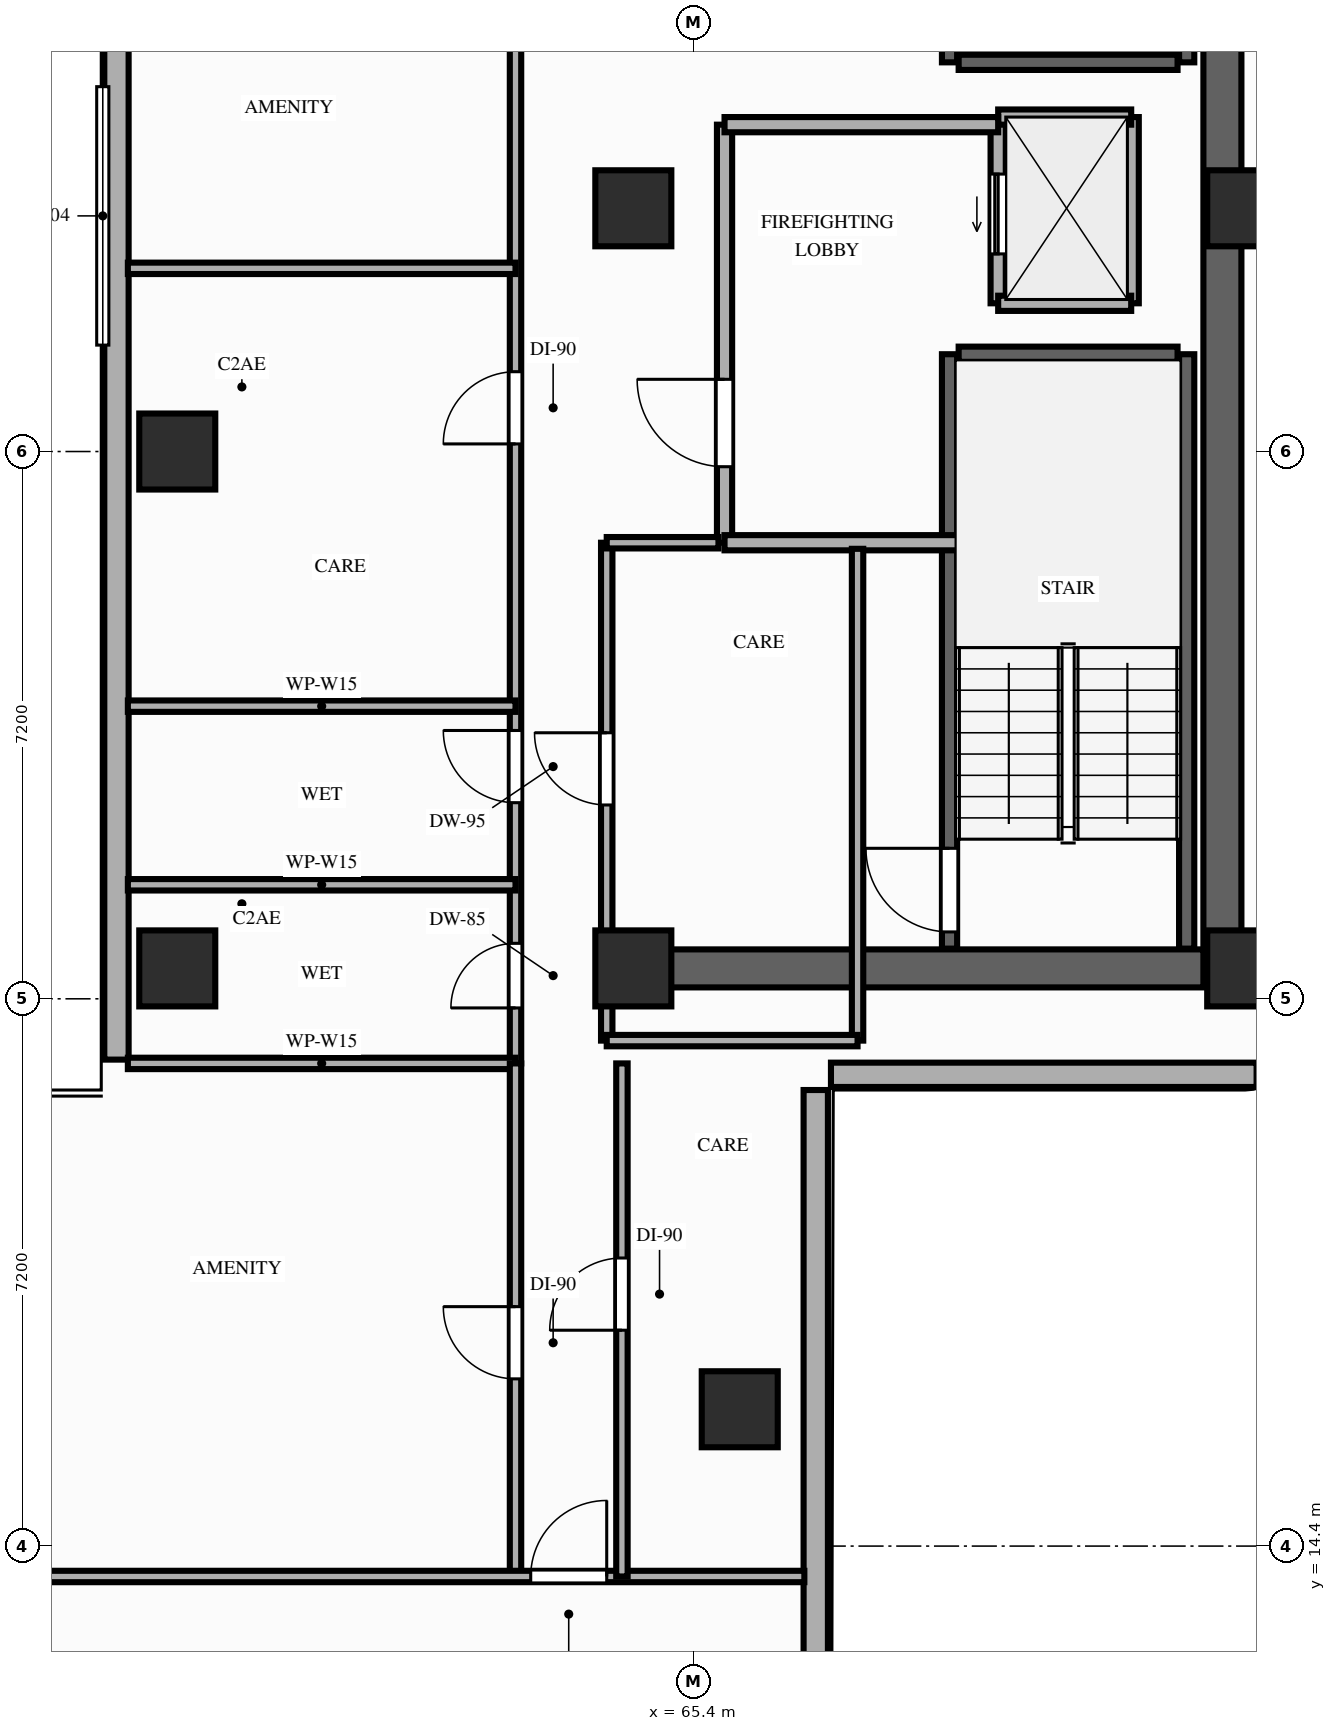
"""IFC4 building model, lengths in metres.
Left out: names, types, materials, properties, quantities, classifications, styles, units other than length and angle.
Written with IfcOpenShell. Run it as: python <this file> out.ifc"""

import sys

from ifc_helpers import new_model, si_unit, direction, frame, frame_2d, origin, origin_2d, place, context, subcontext, project, spatial, rectangle, extrude, element, fill, save


model = new_model("IFC4")
c1 = context("Model", 3, precision=1e-05, world=origin(), true_north=direction((0.0, 1.0)))
c2 = subcontext(c1, "Body", "Model", "MODEL_VIEW")
j1 = project(units=[si_unit("LENGTHUNIT", "METRE"), si_unit("PLANEANGLEUNIT", "RADIAN")], contexts=[c1])
p1 = place(None, origin())
s1 = spatial("IfcSite", under=j1, at=p1, CompositionType="ELEMENT")
p2 = place(p1, origin())
s2 = spatial("IfcBuilding", under=s1, at=p2, CompositionType="ELEMENT")
p3 = place(p2, frame((0.0, 0.0, 53.2)))
s3 = spatial("IfcBuildingStorey", under=s2, at=p3, CompositionType="ELEMENT", Elevation=53.2)
for number, where, z_axis, x_axis in (
    (1, (64.6, 22.0, 0.0), (0.0, 0.0, 1.0), (1.0, 0.0, 0.0)),
    (2, (72.65, 22.0, 0.0), (0.0, 0.0, 1.0), (1.0, 0.0, 0.0)),
    (3, (64.6, 32.0, 0.0), (0.0, 0.0, 1.0), (1.0, 0.0, 0.0)),
    (4, (72.65, 32.0, 0.0), (0.0, 0.0, 1.0), (1.0, 0.0, 0.0)),
    (5, (58.6, 22.0, 0.0), (0.0, 0.0, 1.0), (1.0, 0.0, 0.0)),
    (6, (58.6, 28.8, 0.0), (0.0, 0.0, 1.0), (1.0, 0.0, 0.0)),
    (7, (66.0, 16.2, 0.0), (0.0, 0.0, 1.0), (1.0, 0.0, 0.0)),
):
    element("IfcColumn", number, at=place(p3, frame(where, z_axis=z_axis, x_axis=x_axis)), inside=s3, PredefinedType="COLUMN", context=c2, shape_type="SweptSolid", body=[
        extrude(rectangle(XDim=1.0, YDim=1.0, at=origin_2d()), origin(), (0.0, 0.0, 1.0), 3.2),
    ])
p4 = place(p3, frame((57.8, 43.4, 0.0), z_axis=(0.0, 0.0, 1.0), x_axis=(0.0, -1.0, 0.0)))
e8 = element("IfcWall", 8, at=p4, inside=s3, PredefinedType="STANDARD", context=c2, shape_type="SweptSolid", body=[
    extrude(rectangle(XDim=22.6, YDim=0.32, at=frame_2d((11.3, 0.0))), origin(), (0.0, 0.0, 1.0), 2.5),
])
p5 = place(p3, frame((67.0, 7.6, 0.0), z_axis=(0.0, 0.0, 1.0), x_axis=(0.0, 1.0, 0.0)))
e9 = element("IfcWall", 9, at=p5, inside=s3, PredefinedType="STANDARD", context=c2, shape_type="SweptSolid", body=[
    extrude(rectangle(XDim=12.8, YDim=0.32, at=frame_2d((6.4, 0.0))), origin(), (0.0, 0.0, 1.0), 3.02),
])
p6 = place(p3, frame((67.2, 20.6, 0.0), z_axis=(0.0, 0.0, 1.0), x_axis=(1.0, 0.0, 0.0)))
e10 = element("IfcWall", 10, at=p6, inside=s3, PredefinedType="STANDARD", context=c2, shape_type="SweptSolid", body=[
    extrude(rectangle(XDim=5.6, YDim=0.32, at=frame_2d((2.8, 0.0))), origin(), (0.0, 0.0, 1.0), 3.02),
])
p7 = place(p3, frame((72.35, 22.0, 0.0), z_axis=(0.0, 0.0, 1.0), x_axis=(0.0, 1.0, 0.0)))
e11 = element("IfcWall", 11, at=p7, inside=s3, PredefinedType="SHEAR", context=c2, shape_type="SweptSolid", body=[
    extrude(rectangle(XDim=20.25, YDim=0.5, at=frame_2d((10.125, 0.0))), origin(), (0.0, 0.0, 1.0), 3.02),
])
p8 = place(p3, frame((64.6, 22.0, 0.0), z_axis=(0.0, 0.0, 1.0), x_axis=(1.0, 0.0, 0.0)))
e12 = element("IfcWall", 12, at=p8, inside=s3, PredefinedType="SHEAR", context=c2, shape_type="SweptSolid", body=[
    extrude(rectangle(XDim=7.5, YDim=0.5, at=frame_2d((3.75, 0.0))), origin(), (0.0, 0.0, 1.0), 3.02),
])
p9 = place(p3, frame((68.76, 22.26, 0.0), z_axis=(0.0, 0.0, 1.0), x_axis=(0.0, 1.0, 0.0)))
e13 = element("IfcWall", 13, at=p9, inside=s3, PredefinedType="SHEAR", context=c2, shape_type="SweptSolid", body=[
    extrude(rectangle(XDim=7.82, YDim=0.2, at=frame_2d((3.91, 0.0))), origin(), (0.0, 0.0, 1.0), 3.02),
])
p10 = place(p9, frame((0.22, 0.0, 0.0)))
e14 = element("IfcOpeningElement", 14, at=p10, cuts=e13, PredefinedType="OPENING", context=c2, shape_type="SweptSolid", body=[
    extrude(rectangle(XDim=1.1, YDim=2.15, at=frame_2d((0.55, 1.075))), frame((0.0, 0.11, 0.0), z_axis=(0.0, -1.0, 0.0), x_axis=(1.0, 0.0, 0.0)), (0.0, 0.0, 1.0), 0.22),
])
p11 = place(p3, frame((71.88, 22.26, 0.0), z_axis=(0.0, 0.0, 1.0), x_axis=(0.0, 1.0, 0.0)))
e15 = element("IfcWall", 15, at=p11, inside=s3, PredefinedType="SHEAR", context=c2, shape_type="SweptSolid", body=[
    extrude(rectangle(XDim=7.82, YDim=0.2, at=frame_2d((3.91, 0.0))), origin(), (0.0, 0.0, 1.0), 3.02),
])
p12 = place(p3, frame((68.88, 30.08, 0.0), z_axis=(0.0, 0.0, 1.0), x_axis=(1.0, 0.0, 0.0)))
e16 = element("IfcWall", 16, at=p12, inside=s3, PredefinedType="SHEAR", context=c2, shape_type="SweptSolid", body=[
    extrude(rectangle(XDim=2.88, YDim=0.2, at=frame_2d((1.44, 0.0))), origin(), (0.0, 0.0, 1.0), 3.02),
])
p13 = place(p3, frame((68.76, 33.92, 0.0), z_axis=(0.0, 0.0, 1.0), x_axis=(0.0, 1.0, 0.0)))
e17 = element("IfcWall", 17, at=p13, inside=s3, PredefinedType="SHEAR", context=c2, shape_type="SweptSolid", body=[
    extrude(rectangle(XDim=7.96, YDim=0.2, at=frame_2d((3.98, 0.0))), origin(), (0.0, 0.0, 1.0), 3.02),
])
p14 = place(p13, frame((0.22, 0.0, 0.0)))
e18 = element("IfcOpeningElement", 18, at=p14, cuts=e17, PredefinedType="OPENING", context=c2, shape_type="SweptSolid", body=[
    extrude(rectangle(XDim=1.1, YDim=2.15, at=frame_2d((0.55, 1.075))), frame((0.0, 0.11, 0.0), z_axis=(0.0, -1.0, 0.0), x_axis=(1.0, 0.0, 0.0)), (0.0, 0.0, 1.0), 0.22),
])
p15 = place(p3, frame((71.88, 33.92, 0.0), z_axis=(0.0, 0.0, 1.0), x_axis=(0.0, 1.0, 0.0)))
e19 = element("IfcWall", 19, at=p15, inside=s3, PredefinedType="SHEAR", context=c2, shape_type="SweptSolid", body=[
    extrude(rectangle(XDim=7.96, YDim=0.2, at=frame_2d((3.98, 0.0))), origin(), (0.0, 0.0, 1.0), 3.02),
])
p16 = place(p3, frame((68.88, 33.92, 0.0), z_axis=(0.0, 0.0, 1.0), x_axis=(1.0, 0.0, 0.0)))
e20 = element("IfcWall", 20, at=p16, inside=s3, PredefinedType="SHEAR", context=c2, shape_type="SweptSolid", body=[
    extrude(rectangle(XDim=2.88, YDim=0.2, at=frame_2d((1.44, 0.0))), origin(), (0.0, 0.0, 1.0), 3.02),
])
p17 = place(p3, frame((69.4, 30.75, 0.0), z_axis=(0.0, 0.0, 1.0), x_axis=(0.0, 1.0, 0.0)))
e21 = element("IfcWall", 21, at=p17, inside=s3, PredefinedType="MOVABLE", context=c2, shape_type="SweptSolid", body=[
    extrude(rectangle(XDim=2.45, YDim=0.2, at=frame_2d((1.225, 0.0))), origin(), (0.0, 0.0, 1.0), 3.02),
])
p18 = place(p17, frame((0.65, 0.0, 0.0)))
e22 = element("IfcOpeningElement", 22, at=p18, cuts=e21, PredefinedType="OPENING", context=c2, shape_type="SweptSolid", body=[
    extrude(rectangle(XDim=1.05, YDim=2.15, at=frame_2d((0.525, 1.075))), frame((0.0, 0.11, 0.0), z_axis=(0.0, -1.0, 0.0), x_axis=(1.0, 0.0, 0.0)), (0.0, 0.0, 1.0), 0.22),
])
p19 = place(p3, frame((71.15, 30.75, 0.0), z_axis=(0.0, 0.0, 1.0), x_axis=(0.0, 1.0, 0.0)))
e23 = element("IfcWall", 23, at=p19, inside=s3, PredefinedType="MOVABLE", context=c2, shape_type="SweptSolid", body=[
    extrude(rectangle(XDim=2.45, YDim=0.2, at=frame_2d((1.225, 0.0))), origin(), (0.0, 0.0, 1.0), 3.02),
])
for number, where, z_axis, x_axis in (
    (24, (69.4, 33.2, 0.0), (0.0, 0.0, 1.0), (1.0, 0.0, 0.0)),
    (25, (69.4, 30.75, 0.0), (0.0, 0.0, 1.0), (1.0, 0.0, 0.0)),
):
    element("IfcWall", number, at=place(p3, frame(where, z_axis=z_axis, x_axis=x_axis)), inside=s3, PredefinedType="MOVABLE", context=c2, shape_type="SweptSolid", body=[
        extrude(rectangle(XDim=1.75, YDim=0.2, at=frame_2d((0.875, 0.0))), origin(), (0.0, 0.0, 1.0), 3.02),
    ])
p20 = place(p3, frame((65.8, 27.6, 0.0), z_axis=(0.0, 0.0, 1.0), x_axis=(0.0, 1.0, 0.0)))
e26 = element("IfcWall", 26, at=p20, inside=s3, PredefinedType="PARTITIONING", context=c2, shape_type="SweptSolid", body=[
    extrude(rectangle(XDim=5.5, YDim=0.2, at=frame_2d((2.75, 0.0))), origin(), (0.0, 0.0, 1.0), 3.02),
])
p21 = place(p20, frame((1.0, 0.0, 0.0)))
e27 = element("IfcOpeningElement", 27, at=p21, cuts=e26, PredefinedType="OPENING", context=c2, shape_type="SweptSolid", body=[
    extrude(rectangle(XDim=1.15, YDim=2.15, at=frame_2d((0.575, 1.075))), frame((0.0, 0.11, 0.0), z_axis=(0.0, -1.0, 0.0), x_axis=(1.0, 0.0, 0.0)), (0.0, 0.0, 1.0), 0.22),
])
p22 = place(p3, frame((65.8, 33.1, 0.0), z_axis=(0.0, 0.0, 1.0), x_axis=(1.0, 0.0, 0.0)))
e28 = element("IfcWall", 28, at=p22, inside=s3, PredefinedType="PARTITIONING", context=c2, shape_type="SweptSolid", body=[
    extrude(rectangle(XDim=3.6, YDim=0.2, at=frame_2d((1.8, 0.0))), origin(), (0.0, 0.0, 1.0), 3.02),
])
p23 = place(p3, frame((65.8, 27.6, 0.0), z_axis=(0.0, 0.0, 1.0), x_axis=(1.0, 0.0, 0.0)))
e29 = element("IfcWall", 29, at=p23, inside=s3, PredefinedType="PARTITIONING", context=c2, shape_type="SweptSolid", body=[
    extrude(rectangle(XDim=3.4, YDim=0.2, at=frame_2d((1.7, 0.0))), origin(), (0.0, 0.0, 1.0), 3.02),
])
p24 = place(p3, frame((64.25, 21.05, 0.0), z_axis=(0.0, 0.0, 1.0), x_axis=(0.0, 1.0, 0.0)))
e30 = element("IfcWall", 30, at=p24, inside=s3, PredefinedType="PARTITIONING", context=c2, shape_type="SweptSolid", body=[
    extrude(rectangle(XDim=6.55, YDim=0.15, at=frame_2d((3.275, 0.0))), origin(), (0.0, 0.0, 1.0), 2.5),
])
p25 = place(p24, frame((3.1, 0.0, 0.0)))
e31 = element("IfcOpeningElement", 31, at=p25, cuts=e30, PredefinedType="OPENING", context=c2, shape_type="SweptSolid", body=[
    extrude(rectangle(XDim=0.95, YDim=2.15, at=frame_2d((0.475, 1.075))), frame((0.0, 0.085, 0.0), z_axis=(0.0, -1.0, 0.0), x_axis=(1.0, 0.0, 0.0)), (0.0, 0.0, 1.0), 0.17),
])
p26 = place(p3, frame((67.55, 21.05, 0.0), z_axis=(0.0, 0.0, 1.0), x_axis=(0.0, 1.0, 0.0)))
e32 = element("IfcWall", 32, at=p26, inside=s3, PredefinedType="PARTITIONING", context=c2, shape_type="SweptSolid", body=[
    extrude(rectangle(XDim=6.47, YDim=0.15, at=frame_2d((3.235, 0.0))), origin(), (0.0, 0.0, 1.0), 2.5),
])
p27 = place(p3, frame((64.25, 21.05, 0.0), z_axis=(0.0, 0.0, 1.0), x_axis=(1.0, 0.0, 0.0)))
e33 = element("IfcWall", 33, at=p27, inside=s3, PredefinedType="PARTITIONING", context=c2, shape_type="SweptSolid", body=[
    extrude(rectangle(XDim=3.3, YDim=0.15, at=frame_2d((1.65, 0.0))), origin(), (0.0, 0.0, 1.0), 2.5),
])
p28 = place(p3, frame((64.25, 27.6, 0.0), z_axis=(0.0, 0.0, 1.0), x_axis=(1.0, 0.0, 0.0)))
e34 = element("IfcWall", 34, at=p28, inside=s3, PredefinedType="PARTITIONING", context=c2, shape_type="SweptSolid", body=[
    extrude(rectangle(XDim=1.47, YDim=0.15, at=frame_2d((0.735, 0.0))), origin(), (0.0, 0.0, 1.0), 2.5),
])
p29 = place(p3, frame((63.05, 20.75, 0.0), z_axis=(0.0, 0.0, 1.0), x_axis=(0.0, 1.0, 0.0)))
e35 = element("IfcWall", 35, at=p29, inside=s3, PredefinedType="PARTITIONING", context=c2, shape_type="SweptSolid", body=[
    extrude(rectangle(XDim=22.7, YDim=0.15, at=frame_2d((11.35, 0.0))), origin(), (0.0, 0.0, 1.0), 2.5),
])
p30 = place(p29, frame((0.73, 0.0, 0.0)))
e36 = element("IfcOpeningElement", 36, at=p30, cuts=e35, PredefinedType="OPENING", context=c2, shape_type="SweptSolid", body=[
    extrude(rectangle(XDim=0.85, YDim=2.1, at=frame_2d((0.425, 1.05))), frame((0.0, 0.085, 0.0), z_axis=(0.0, -1.0, 0.0), x_axis=(1.0, 0.0, 0.0)), (0.0, 0.0, 1.0), 0.17),
])
p31 = place(p29, frame((3.43, 0.0, 0.0)))
e37 = element("IfcOpeningElement", 37, at=p31, cuts=e35, PredefinedType="OPENING", context=c2, shape_type="SweptSolid", body=[
    extrude(rectangle(XDim=0.95, YDim=2.1, at=frame_2d((0.475, 1.05))), frame((0.0, 0.085, 0.0), z_axis=(0.0, -1.0, 0.0), x_axis=(1.0, 0.0, 0.0)), (0.0, 0.0, 1.0), 0.17),
])
p32 = place(p29, frame((8.15, 0.0, 0.0)))
e38 = element("IfcOpeningElement", 38, at=p32, cuts=e35, PredefinedType="OPENING", context=c2, shape_type="SweptSolid", body=[
    extrude(rectangle(XDim=0.95, YDim=2.15, at=frame_2d((0.475, 1.075))), frame((0.0, 0.085, 0.0), z_axis=(0.0, -1.0, 0.0), x_axis=(1.0, 0.0, 0.0)), (0.0, 0.0, 1.0), 0.17),
])
p33 = place(p29, frame((13.67, 0.0, 0.0)))
e39 = element("IfcOpeningElement", 39, at=p33, cuts=e35, PredefinedType="OPENING", context=c2, shape_type="SweptSolid", body=[
    extrude(rectangle(XDim=0.95, YDim=2.15, at=frame_2d((0.475, 1.075))), frame((0.0, 0.085, 0.0), z_axis=(0.0, -1.0, 0.0), x_axis=(1.0, 0.0, 0.0)), (0.0, 0.0, 1.0), 0.17),
])
p34 = place(p29, frame((19.47, 0.0, 0.0)))
e40 = element("IfcOpeningElement", 40, at=p34, cuts=e35, PredefinedType="OPENING", context=c2, shape_type="SweptSolid", body=[
    extrude(rectangle(XDim=0.95, YDim=2.15, at=frame_2d((0.475, 1.075))), frame((0.0, 0.085, 0.0), z_axis=(0.0, -1.0, 0.0), x_axis=(1.0, 0.0, 0.0)), (0.0, 0.0, 1.0), 0.17),
])
for number, where, z_axis, x_axis in (
    (41, (57.95, 20.75, 0.0), (0.0, 0.0, 1.0), (1.0, 0.0, 0.0)),
    (42, (57.95, 23.1, 0.0), (0.0, 0.0, 1.0), (1.0, 0.0, 0.0)),
    (43, (57.95, 25.45, 0.0), (0.0, 0.0, 1.0), (1.0, 0.0, 0.0)),
    (44, (57.95, 31.21, 0.0), (0.0, 0.0, 1.0), (1.0, 0.0, 0.0)),
):
    element("IfcWall", number, at=place(p3, frame(where, z_axis=z_axis, x_axis=x_axis)), inside=s3, PredefinedType="PARTITIONING", context=c2, shape_type="SweptSolid", body=[
        extrude(rectangle(XDim=5.1, YDim=0.15, at=frame_2d((2.55, 0.0))), origin(), (0.0, 0.0, 1.0), 2.5),
    ])
p35 = place(p3, frame((63.05, 14.0, 0.0), z_axis=(0.0, 0.0, 1.0), x_axis=(0.0, 1.0, 0.0)))
e45 = element("IfcWall", 45, at=p35, inside=s3, PredefinedType="PARTITIONING", context=c2, shape_type="SweptSolid", body=[
    extrude(rectangle(XDim=6.75, YDim=0.15, at=frame_2d((3.375, 0.0))), origin(), (0.0, 0.0, 1.0), 2.5),
])
p36 = place(p35, frame((2.6, 0.0, 0.0)))
e46 = element("IfcOpeningElement", 46, at=p36, cuts=e45, PredefinedType="OPENING", context=c2, shape_type="SweptSolid", body=[
    extrude(rectangle(XDim=0.95, YDim=2.15, at=frame_2d((0.475, 1.075))), frame((0.0, 0.085, 0.0), z_axis=(0.0, -1.0, 0.0), x_axis=(1.0, 0.0, 0.0)), (0.0, 0.0, 1.0), 0.17),
])
p37 = place(p3, frame((55.55, 14.0, 0.0), z_axis=(0.0, 0.0, 1.0), x_axis=(1.0, 0.0, 0.0)))
e47 = element("IfcWall", 47, at=p37, inside=s3, PredefinedType="PARTITIONING", context=c2, shape_type="SweptSolid", body=[
    extrude(rectangle(XDim=11.3, YDim=0.15, at=frame_2d((5.65, 0.0))), origin(), (0.0, 0.0, 1.0), 2.5),
])
p38 = place(p37, frame((7.7, 0.0, 0.0)))
e48 = element("IfcOpeningElement", 48, at=p38, cuts=e47, PredefinedType="OPENING", context=c2, shape_type="SweptSolid", body=[
    extrude(rectangle(XDim=1.0, YDim=2.15, at=frame_2d((0.5, 1.075))), frame((0.0, 0.085, 0.0), z_axis=(0.0, -1.0, 0.0), x_axis=(1.0, 0.0, 0.0)), (0.0, 0.0, 1.0), 0.17),
])
p39 = place(p3, frame((64.45, 14.0, 0.0), z_axis=(0.0, 0.0, 1.0), x_axis=(0.0, 1.0, 0.0)))
e49 = element("IfcWall", 49, at=p39, inside=s3, PredefinedType="PARTITIONING", context=c2, shape_type="SweptSolid", body=[
    extrude(rectangle(XDim=6.75, YDim=0.15, at=frame_2d((3.375, 0.0))), origin(), (0.0, 0.0, 1.0), 2.5),
])
p40 = place(p39, frame((3.24, 0.0, 0.0)))
e50 = element("IfcOpeningElement", 50, at=p40, cuts=e49, PredefinedType="OPENING", context=c2, shape_type="SweptSolid", body=[
    extrude(rectangle(XDim=0.95, YDim=2.15, at=frame_2d((0.475, 1.075))), frame((0.0, 0.085, 0.0), z_axis=(0.0, -1.0, 0.0), x_axis=(1.0, 0.0, 0.0)), (0.0, 0.0, 1.0), 0.17),
])
p41 = place(p10, origin())
e51 = element("IfcDoor", 51, at=p41, inside=s3, OperationType="SINGLE_SWING_RIGHT", PredefinedType="DOOR", context=c2, shape_type="SweptSolid", body=[
    extrude(rectangle(XDim=1.1, YDim=2.15, at=frame_2d((0.55, 1.075))), frame((0.0, 0.025, 0.0), z_axis=(0.0, -1.0, 0.0), x_axis=(1.0, 0.0, 0.0)), (0.0, 0.0, 1.0), 0.05),
])
fill(e14, e51)
p42 = place(p18, origin())
e52 = element("IfcDoor", 52, at=p42, inside=s3, OperationType="SLIDING_TO_LEFT", PredefinedType="DOOR", context=c2, shape_type="SweptSolid", body=[
    extrude(rectangle(XDim=1.05, YDim=2.15, at=frame_2d((0.525, 1.075))), frame((0.0, 0.025, 0.0), z_axis=(0.0, -1.0, 0.0), x_axis=(1.0, 0.0, 0.0)), (0.0, 0.0, 1.0), 0.05),
])
fill(e22, e52)
p43 = place(p21, origin())
e53 = element("IfcDoor", 53, at=p43, inside=s3, OperationType="SINGLE_SWING_RIGHT", PredefinedType="DOOR", context=c2, shape_type="SweptSolid", body=[
    extrude(rectangle(XDim=1.15, YDim=2.15, at=frame_2d((0.575, 1.075))), frame((0.0, 0.025, 0.0), z_axis=(0.0, -1.0, 0.0), x_axis=(1.0, 0.0, 0.0)), (0.0, 0.0, 1.0), 0.05),
])
fill(e27, e53)
p44 = place(p25, origin())
e54 = element("IfcDoor", 54, at=p44, inside=s3, OperationType="SINGLE_SWING_RIGHT", PredefinedType="DOOR", context=c2, shape_type="SweptSolid", body=[
    extrude(rectangle(XDim=0.95, YDim=2.15, at=frame_2d((0.475, 1.075))), frame((0.0, 0.025, 0.0), z_axis=(0.0, -1.0, 0.0), x_axis=(1.0, 0.0, 0.0)), (0.0, 0.0, 1.0), 0.05),
])
fill(e31, e54)
p45 = place(p30, origin())
e55 = element("IfcDoor", 55, at=p45, inside=s3, OperationType="SINGLE_SWING_LEFT", PredefinedType="DOOR", context=c2, shape_type="SweptSolid", body=[
    extrude(rectangle(XDim=0.85, YDim=2.1, at=frame_2d((0.425, 1.05))), frame((0.0, 0.025, 0.0), z_axis=(0.0, -1.0, 0.0), x_axis=(1.0, 0.0, 0.0)), (0.0, 0.0, 1.0), 0.05),
])
fill(e36, e55)
p46 = place(p31, origin())
e56 = element("IfcDoor", 56, at=p46, inside=s3, OperationType="SINGLE_SWING_RIGHT", PredefinedType="DOOR", context=c2, shape_type="SweptSolid", body=[
    extrude(rectangle(XDim=0.95, YDim=2.1, at=frame_2d((0.475, 1.05))), frame((0.0, 0.025, 0.0), z_axis=(0.0, -1.0, 0.0), x_axis=(1.0, 0.0, 0.0)), (0.0, 0.0, 1.0), 0.05),
])
fill(e37, e56)
p47 = place(p32, origin())
e57 = element("IfcDoor", 57, at=p47, inside=s3, OperationType="SINGLE_SWING_LEFT", PredefinedType="DOOR", context=c2, shape_type="SweptSolid", body=[
    extrude(rectangle(XDim=0.95, YDim=2.15, at=frame_2d((0.475, 1.075))), frame((0.0, 0.025, 0.0), z_axis=(0.0, -1.0, 0.0), x_axis=(1.0, 0.0, 0.0)), (0.0, 0.0, 1.0), 0.05),
])
fill(e38, e57)
p48 = place(p36, origin())
e58 = element("IfcDoor", 58, at=p48, inside=s3, OperationType="SINGLE_SWING_RIGHT", PredefinedType="DOOR", context=c2, shape_type="SweptSolid", body=[
    extrude(rectangle(XDim=0.95, YDim=2.15, at=frame_2d((0.475, 1.075))), frame((0.0, 0.025, 0.0), z_axis=(0.0, -1.0, 0.0), x_axis=(1.0, 0.0, 0.0)), (0.0, 0.0, 1.0), 0.05),
])
fill(e46, e58)
p49 = place(p40, origin())
e59 = element("IfcDoor", 59, at=p49, inside=s3, OperationType="SINGLE_SWING_LEFT", PredefinedType="DOOR", context=c2, shape_type="SweptSolid", body=[
    extrude(rectangle(XDim=0.95, YDim=2.15, at=frame_2d((0.475, 1.075))), frame((0.0, 0.025, 0.0), z_axis=(0.0, -1.0, 0.0), x_axis=(1.0, 0.0, 0.0)), (0.0, 0.0, 1.0), 0.05),
])
fill(e50, e59)
p50 = place(p38, origin())
e60 = element("IfcDoor", 60, at=p50, inside=s3, OperationType="SINGLE_SWING_RIGHT", PredefinedType="DOOR", context=c2, shape_type="SweptSolid", body=[
    extrude(rectangle(XDim=1.0, YDim=2.15, at=frame_2d((0.5, 1.075))), frame((0.0, 0.025, 0.0), z_axis=(0.0, -1.0, 0.0), x_axis=(1.0, 0.0, 0.0)), (0.0, 0.0, 1.0), 0.05),
])
fill(e48, e60)
save(model, sys.argv[1])
